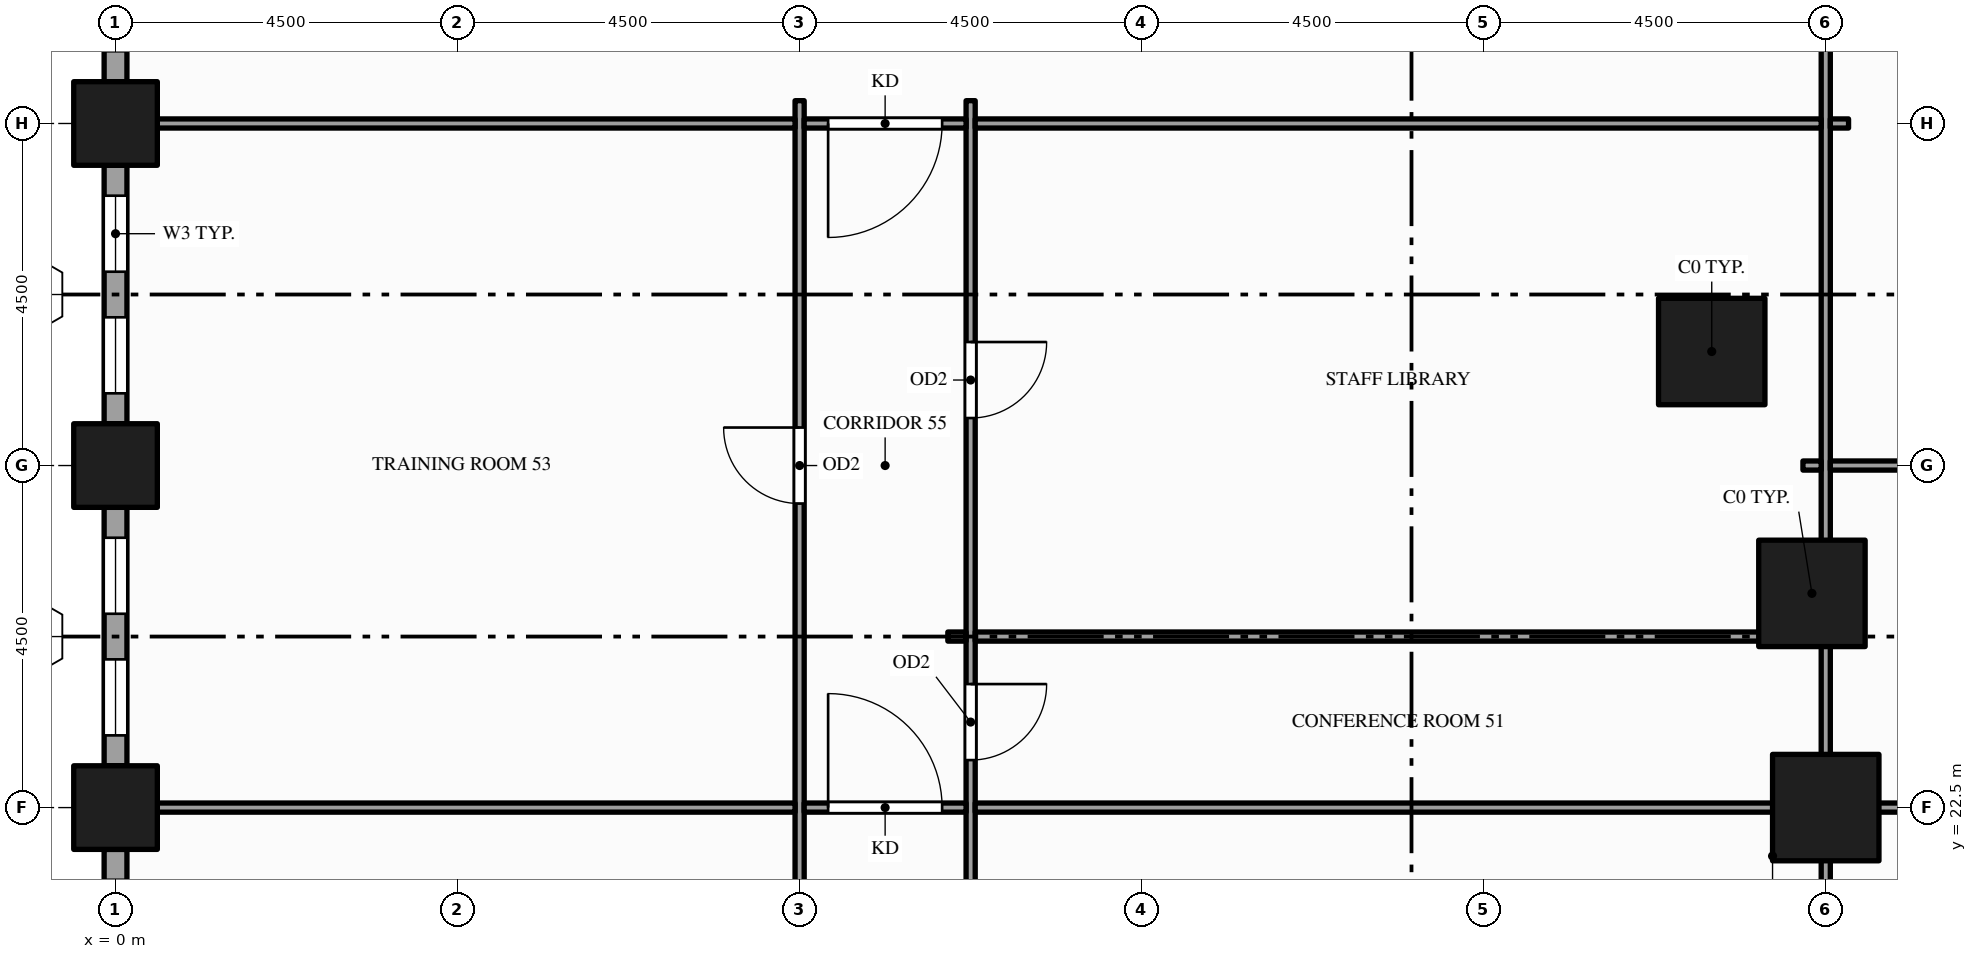
"""IFC4 building model, lengths in metres.
Left out: names, types, materials, properties, quantities, classifications, styles, units other than length and angle.
Written with IfcOpenShell. Run it as: python <this file> out.ifc"""

import sys

from ifc_helpers import new_model, si_unit, direction, frame, frame_2d, origin, origin_2d, place, context, subcontext, project, spatial, rectangle, hollow_rectangle, extrude, element, fill, save


model = new_model("IFC4")
c1 = context("Model", 3, precision=1e-05, world=origin(), true_north=direction((0.0, 1.0)))
c2 = subcontext(c1, "Body", "Model", "MODEL_VIEW")
j1 = project(units=[si_unit("LENGTHUNIT", "METRE"), si_unit("PLANEANGLEUNIT", "RADIAN")], contexts=[c1])
p1 = place(None, origin())
s1 = spatial("IfcSite", under=j1, at=p1, CompositionType="ELEMENT")
p2 = place(p1, origin())
s2 = spatial("IfcBuilding", under=s1, at=p2, CompositionType="ELEMENT")
p3 = place(p2, frame((0.0, 0.0, 19.0)))
s3 = spatial("IfcBuildingStorey", under=s2, at=p3, CompositionType="ELEMENT", Elevation=19.0)
for number, where, z_axis, x_axis in (
    (1, (0.0, 22.5, -0.25), (0.0, 0.0, 1.0), (1.0, 0.0, 0.0)),
    (2, (0.0, 27.0, -0.25), (0.0, 0.0, 1.0), (1.0, 0.0, 0.0)),
    (3, (0.0, 31.5, -0.25), (0.0, 0.0, 1.0), (1.0, 0.0, 0.0)),
):
    element("IfcColumn", number, at=place(p3, frame(where, z_axis=z_axis, x_axis=x_axis)), inside=s3, PredefinedType="COLUMN", context=c2, shape_type="SweptSolid", body=[
        extrude(hollow_rectangle(XDim=1.1, YDim=1.1, WallThickness=0.06, at=origin_2d()), origin(), (0.0, 0.0, 1.0), 5.0),
    ])
for number, where, z_axis, x_axis in (
    (4, (21.0, 28.5, -0.25), (0.0, 0.0, 1.0), (1.0, 0.0, 0.0)),
    (5, (22.318, 25.318, -0.25), (0.0, 0.0, 1.0), (1.0, 0.0, 0.0)),
    (6, (22.5, 22.5, -0.25), (0.0, 0.0, 1.0), (1.0, 0.0, 0.0)),
):
    element("IfcColumn", number, at=place(p3, frame(where, z_axis=z_axis, x_axis=x_axis)), inside=s3, PredefinedType="COLUMN", context=c2, shape_type="SweptSolid", body=[
        extrude(hollow_rectangle(XDim=1.4, YDim=1.4, WallThickness=0.08, at=origin_2d()), origin(), (0.0, 0.0, 1.0), 5.0),
    ])
p4 = place(p3, frame((0.0, 35.999, 0.0), z_axis=(0.0, 0.0, 1.0), x_axis=(0.0, -1.0, 0.0)))
e7 = element("IfcWall", 7, at=p4, inside=s3, PredefinedType="STANDARD", context=c2, shape_type="SweptSolid", body=[
    extrude(rectangle(XDim=3.949, YDim=0.3, at=frame_2d((1.975, 0.0))), origin(), (0.0, 0.0, 1.0), 4.036),
])
p5 = place(p4, frame((0.425, 0.0, 0.9)))
e8 = element("IfcOpeningElement", 8, at=p5, cuts=e7, PredefinedType="OPENING", context=c2, shape_type="SweptSolid", body=[
    extrude(rectangle(XDim=1.5, YDim=2.75, at=frame_2d((0.75, 1.375))), frame((0.0, 0.16, 0.0), z_axis=(0.0, -1.0, 0.0), x_axis=(1.0, 0.0, 0.0)), (0.0, 0.0, 1.0), 0.32),
])
p6 = place(p4, frame((2.549, 0.0, 0.9)))
e9 = element("IfcOpeningElement", 9, at=p6, cuts=e7, PredefinedType="OPENING", context=c2, shape_type="SweptSolid", body=[
    extrude(rectangle(XDim=1.0, YDim=2.75, at=frame_2d((0.5, 1.375))), frame((0.0, 0.16, 0.0), z_axis=(0.0, -1.0, 0.0), x_axis=(1.0, 0.0, 0.0)), (0.0, 0.0, 1.0), 0.32),
])
p7 = place(p3, frame((0.0, 30.95, 0.0), z_axis=(0.0, 0.0, 1.0), x_axis=(0.0, -1.0, 0.0)))
e10 = element("IfcWall", 10, at=p7, inside=s3, PredefinedType="STANDARD", context=c2, shape_type="SweptSolid", body=[
    extrude(rectangle(XDim=3.4, YDim=0.3, at=frame_2d((1.7, 0.0))), origin(), (0.0, 0.0, 1.0), 4.036),
])
p8 = place(p7, frame((0.4, 0.0, 0.9)))
e11 = element("IfcOpeningElement", 11, at=p8, cuts=e10, PredefinedType="OPENING", context=c2, shape_type="SweptSolid", body=[
    extrude(rectangle(XDim=1.0, YDim=2.75, at=frame_2d((0.5, 1.375))), frame((0.0, 0.16, 0.0), z_axis=(0.0, -1.0, 0.0), x_axis=(1.0, 0.0, 0.0)), (0.0, 0.0, 1.0), 0.32),
])
p9 = place(p7, frame((2.0, 0.0, 0.9)))
e12 = element("IfcOpeningElement", 12, at=p9, cuts=e10, PredefinedType="OPENING", context=c2, shape_type="SweptSolid", body=[
    extrude(rectangle(XDim=1.0, YDim=2.75, at=frame_2d((0.5, 1.375))), frame((0.0, 0.16, 0.0), z_axis=(0.0, -1.0, 0.0), x_axis=(1.0, 0.0, 0.0)), (0.0, 0.0, 1.0), 0.32),
])
p10 = place(p3, frame((0.0, 26.45, 0.0), z_axis=(0.0, 0.0, 1.0), x_axis=(0.0, -1.0, 0.0)))
e13 = element("IfcWall", 13, at=p10, inside=s3, PredefinedType="STANDARD", context=c2, shape_type="SweptSolid", body=[
    extrude(rectangle(XDim=3.4, YDim=0.3, at=frame_2d((1.7, 0.0))), origin(), (0.0, 0.0, 1.0), 4.036),
])
p11 = place(p10, frame((0.4, 0.0, 0.9)))
e14 = element("IfcOpeningElement", 14, at=p11, cuts=e13, PredefinedType="OPENING", context=c2, shape_type="SweptSolid", body=[
    extrude(rectangle(XDim=1.0, YDim=2.75, at=frame_2d((0.5, 1.375))), frame((0.0, 0.16, 0.0), z_axis=(0.0, -1.0, 0.0), x_axis=(1.0, 0.0, 0.0)), (0.0, 0.0, 1.0), 0.32),
])
p12 = place(p10, frame((2.0, 0.0, 0.9)))
e15 = element("IfcOpeningElement", 15, at=p12, cuts=e13, PredefinedType="OPENING", context=c2, shape_type="SweptSolid", body=[
    extrude(rectangle(XDim=1.0, YDim=2.75, at=frame_2d((0.5, 1.375))), frame((0.0, 0.16, 0.0), z_axis=(0.0, -1.0, 0.0), x_axis=(1.0, 0.0, 0.0)), (0.0, 0.0, 1.0), 0.32),
])
p13 = place(p3, frame((0.0, 21.95, 0.0), z_axis=(0.0, 0.0, 1.0), x_axis=(0.0, -1.0, 0.0)))
e16 = element("IfcWall", 16, at=p13, inside=s3, PredefinedType="STANDARD", context=c2, shape_type="SweptSolid", body=[
    extrude(rectangle(XDim=3.4, YDim=0.3, at=frame_2d((1.7, 0.0))), origin(), (0.0, 0.0, 1.0), 4.036),
])
p14 = place(p13, frame((0.4, 0.0, 0.9)))
e17 = element("IfcOpeningElement", 17, at=p14, cuts=e16, PredefinedType="OPENING", context=c2, shape_type="SweptSolid", body=[
    extrude(rectangle(XDim=1.0, YDim=2.75, at=frame_2d((0.5, 1.375))), frame((0.0, 0.16, 0.0), z_axis=(0.0, -1.0, 0.0), x_axis=(1.0, 0.0, 0.0)), (0.0, 0.0, 1.0), 0.32),
])
p15 = place(p13, frame((2.0, 0.0, 0.9)))
e18 = element("IfcOpeningElement", 18, at=p15, cuts=e16, PredefinedType="OPENING", context=c2, shape_type="SweptSolid", body=[
    extrude(rectangle(XDim=1.0, YDim=2.75, at=frame_2d((0.5, 1.375))), frame((0.0, 0.16, 0.0), z_axis=(0.0, -1.0, 0.0), x_axis=(1.0, 0.0, 0.0)), (0.0, 0.0, 1.0), 0.32),
])
p16 = place(p3, frame((9.0, 10.95, 0.0), z_axis=(0.0, 0.0, 1.0), x_axis=(0.0, 1.0, 0.0)))
e19 = element("IfcWall", 19, at=p16, inside=s3, PredefinedType="PARTITIONING", context=c2, shape_type="SweptSolid", body=[
    extrude(rectangle(XDim=20.85, YDim=0.12, at=frame_2d((10.425, 0.0))), origin(), (0.0, 0.0, 1.0), 3.5),
])
p17 = place(p16, frame((15.55, 0.0, 0.0)))
e20 = element("IfcOpeningElement", 20, at=p17, cuts=e19, PredefinedType="OPENING", context=c2, shape_type="SweptSolid", body=[
    extrude(rectangle(XDim=1.0, YDim=2.1, at=frame_2d((0.5, 1.05))), frame((0.0, 0.07, 0.0), z_axis=(0.0, -1.0, 0.0), x_axis=(1.0, 0.0, 0.0)), (0.0, 0.0, 1.0), 0.14),
])
p18 = place(p3, frame((11.25, 10.95, 0.0), z_axis=(0.0, 0.0, 1.0), x_axis=(0.0, 1.0, 0.0)))
e21 = element("IfcWall", 21, at=p18, inside=s3, PredefinedType="PARTITIONING", context=c2, shape_type="SweptSolid", body=[
    extrude(rectangle(XDim=20.85, YDim=0.12, at=frame_2d((10.425, 0.0))), origin(), (0.0, 0.0, 1.0), 3.5),
])
p19 = place(p18, frame((5.425, 0.0, 0.0)))
e22 = element("IfcOpeningElement", 22, at=p19, cuts=e21, PredefinedType="OPENING", context=c2, shape_type="SweptSolid", body=[
    extrude(rectangle(XDim=1.0, YDim=2.1, at=frame_2d((0.5, 1.05))), frame((0.0, 0.07, 0.0), z_axis=(0.0, -1.0, 0.0), x_axis=(1.0, 0.0, 0.0)), (0.0, 0.0, 1.0), 0.14),
])
p20 = place(p18, frame((12.175, 0.0, 0.0)))
e23 = element("IfcOpeningElement", 23, at=p20, cuts=e21, PredefinedType="OPENING", context=c2, shape_type="SweptSolid", body=[
    extrude(rectangle(XDim=1.0, YDim=2.1, at=frame_2d((0.5, 1.05))), frame((0.0, 0.07, 0.0), z_axis=(0.0, -1.0, 0.0), x_axis=(1.0, 0.0, 0.0)), (0.0, 0.0, 1.0), 0.14),
])
p21 = place(p18, frame((16.675, 0.0, 0.0)))
e24 = element("IfcOpeningElement", 24, at=p21, cuts=e21, PredefinedType="OPENING", context=c2, shape_type="SweptSolid", body=[
    extrude(rectangle(XDim=1.0, YDim=2.1, at=frame_2d((0.5, 1.05))), frame((0.0, 0.07, 0.0), z_axis=(0.0, -1.0, 0.0), x_axis=(1.0, 0.0, 0.0)), (0.0, 0.0, 1.0), 0.14),
])
p22 = place(p3, frame((22.5, 0.15, 0.0), z_axis=(0.0, 0.0, 1.0), x_axis=(0.0, 1.0, 0.0)))
e25 = element("IfcWall", 25, at=p22, inside=s3, PredefinedType="PARTITIONING", context=c2, shape_type="SweptSolid", body=[
    extrude(rectangle(XDim=35.95, YDim=0.12, at=frame_2d((17.975, 0.0))), origin(), (0.0, 0.0, 1.0), 3.759),
])
p23 = place(p22, frame((9.225, 0.0, 0.0)))
e26 = element("IfcOpeningElement", 26, at=p23, cuts=e25, PredefinedType="OPENING", context=c2, shape_type="SweptSolid", body=[
    extrude(rectangle(XDim=1.5, YDim=2.1, at=frame_2d((0.75, 1.05))), frame((0.0, 0.07, 0.0), z_axis=(0.0, -1.0, 0.0), x_axis=(1.0, 0.0, 0.0)), (0.0, 0.0, 1.0), 0.14),
])
p24 = place(p22, frame((32.7, 0.0, 0.0)))
e27 = element("IfcOpeningElement", 27, at=p24, cuts=e25, PredefinedType="OPENING", context=c2, shape_type="SweptSolid", body=[
    extrude(rectangle(XDim=1.8, YDim=2.1, at=frame_2d((0.9, 1.05))), frame((0.0, 0.07, 0.0), z_axis=(0.0, -1.0, 0.0), x_axis=(1.0, 0.0, 0.0)), (0.0, 0.0, 1.0), 0.14),
])
p25 = place(p3, frame((0.15, 22.5, 0.0), z_axis=(0.0, 0.0, 1.0), x_axis=(1.0, 0.0, 0.0)))
e28 = element("IfcWall", 28, at=p25, inside=s3, PredefinedType="PARTITIONING", context=c2, shape_type="SweptSolid", body=[
    extrude(rectangle(XDim=8.79, YDim=0.12, at=frame_2d((4.395, 0.0))), origin(), (0.0, 0.0, 1.0), 3.5),
])
p26 = place(p3, frame((9.06, 22.5, 0.0), z_axis=(0.0, 0.0, 1.0), x_axis=(1.0, 0.0, 0.0)))
e29 = element("IfcWall", 29, at=p26, inside=s3, PredefinedType="PARTITIONING", context=c2, shape_type="SweptSolid", body=[
    extrude(rectangle(XDim=2.13, YDim=0.12, at=frame_2d((1.065, 0.0))), origin(), (0.0, 0.0, 1.0), 3.5),
])
p27 = place(p26, frame((0.315, 0.0, 0.0)))
e30 = element("IfcOpeningElement", 30, at=p27, cuts=e29, PredefinedType="OPENING", context=c2, shape_type="SweptSolid", body=[
    extrude(rectangle(XDim=1.5, YDim=2.1, at=frame_2d((0.75, 1.05))), frame((0.0, 0.07, 0.0), z_axis=(0.0, -1.0, 0.0), x_axis=(1.0, 0.0, 0.0)), (0.0, 0.0, 1.0), 0.14),
])
p28 = place(p3, frame((11.31, 22.5, 0.0), z_axis=(0.0, 0.0, 1.0), x_axis=(1.0, 0.0, 0.0)))
e31 = element("IfcWall", 31, at=p28, inside=s3, PredefinedType="PARTITIONING", context=c2, shape_type="SweptSolid", body=[
    extrude(rectangle(XDim=11.13, YDim=0.12, at=frame_2d((5.565, 0.0))), origin(), (0.0, 0.0, 1.0), 3.5),
])
p29 = place(p3, frame((22.56, 22.5, 0.0), z_axis=(0.0, 0.0, 1.0), x_axis=(1.0, 0.0, 0.0)))
e32 = element("IfcWall", 32, at=p29, inside=s3, PredefinedType="PARTITIONING", context=c2, shape_type="SweptSolid", body=[
    extrude(rectangle(XDim=13.38, YDim=0.12, at=frame_2d((6.69, 0.0))), origin(), (0.0, 0.0, 1.0), 3.66),
])
p30 = place(p3, frame((10.95, 24.75, 0.0), z_axis=(0.0, 0.0, 1.0), x_axis=(1.0, 0.0, 0.0)))
e33 = element("IfcWall", 33, at=p30, inside=s3, PredefinedType="PARTITIONING", context=c2, shape_type="SweptSolid", body=[
    extrude(rectangle(XDim=0.24, YDim=0.12, at=frame_2d((0.12, 0.0))), origin(), (0.0, 0.0, 1.0), 3.759),
])
p31 = place(p3, frame((11.31, 24.75, 0.0), z_axis=(0.0, 0.0, 1.0), x_axis=(1.0, 0.0, 0.0)))
e34 = element("IfcWall", 34, at=p31, inside=s3, PredefinedType="PARTITIONING", context=c2, shape_type="SweptSolid", body=[
    extrude(rectangle(XDim=11.13, YDim=0.12, at=frame_2d((5.565, 0.0))), origin(), (0.0, 0.0, 1.0), 3.759),
])
p32 = place(p3, frame((22.56, 24.75, 0.0), z_axis=(0.0, 0.0, 1.0), x_axis=(1.0, 0.0, 0.0)))
e35 = element("IfcWall", 35, at=p32, inside=s3, PredefinedType="PARTITIONING", context=c2, shape_type="SweptSolid", body=[
    extrude(rectangle(XDim=0.24, YDim=0.12, at=frame_2d((0.12, 0.0))), origin(), (0.0, 0.0, 1.0), 4.75),
])
p33 = place(p3, frame((22.2, 27.0, 0.0), z_axis=(0.0, 0.0, 1.0), x_axis=(1.0, 0.0, 0.0)))
e36 = element("IfcWall", 36, at=p33, inside=s3, PredefinedType="PARTITIONING", context=c2, shape_type="SweptSolid", body=[
    extrude(rectangle(XDim=0.24, YDim=0.12, at=frame_2d((0.12, 0.0))), origin(), (0.0, 0.0, 1.0), 3.759),
])
p34 = place(p3, frame((22.56, 27.0, 0.0), z_axis=(0.0, 0.0, 1.0), x_axis=(1.0, 0.0, 0.0)))
e37 = element("IfcWall", 37, at=p34, inside=s3, PredefinedType="PARTITIONING", context=c2, shape_type="SweptSolid", body=[
    extrude(rectangle(XDim=4.38, YDim=0.12, at=frame_2d((2.19, 0.0))), origin(), (0.0, 0.0, 1.0), 3.66),
])
p35 = place(p34, frame((1.29, 0.0, 0.0)))
e38 = element("IfcOpeningElement", 38, at=p35, cuts=e37, PredefinedType="OPENING", context=c2, shape_type="SweptSolid", body=[
    extrude(rectangle(XDim=1.8, YDim=2.1, at=frame_2d((0.9, 1.05))), frame((0.0, 0.07, 0.0), z_axis=(0.0, -1.0, 0.0), x_axis=(1.0, 0.0, 0.0)), (0.0, 0.0, 1.0), 0.14),
])
p36 = place(p3, frame((0.15, 31.5, 0.0), z_axis=(0.0, 0.0, 1.0), x_axis=(1.0, 0.0, 0.0)))
e39 = element("IfcWall", 39, at=p36, inside=s3, PredefinedType="PARTITIONING", context=c2, shape_type="SweptSolid", body=[
    extrude(rectangle(XDim=8.79, YDim=0.12, at=frame_2d((4.395, 0.0))), origin(), (0.0, 0.0, 1.0), 3.759),
])
p37 = place(p3, frame((9.06, 31.5, 0.0), z_axis=(0.0, 0.0, 1.0), x_axis=(1.0, 0.0, 0.0)))
e40 = element("IfcWall", 40, at=p37, inside=s3, PredefinedType="PARTITIONING", context=c2, shape_type="SweptSolid", body=[
    extrude(rectangle(XDim=2.13, YDim=0.12, at=frame_2d((1.065, 0.0))), origin(), (0.0, 0.0, 1.0), 3.759),
])
p38 = place(p37, frame((0.315, 0.0, 0.0)))
e41 = element("IfcOpeningElement", 41, at=p38, cuts=e40, PredefinedType="OPENING", context=c2, shape_type="SweptSolid", body=[
    extrude(rectangle(XDim=1.5, YDim=2.1, at=frame_2d((0.75, 1.05))), frame((0.0, 0.07, 0.0), z_axis=(0.0, -1.0, 0.0), x_axis=(1.0, 0.0, 0.0)), (0.0, 0.0, 1.0), 0.14),
])
p39 = place(p3, frame((11.31, 31.5, 0.0), z_axis=(0.0, 0.0, 1.0), x_axis=(1.0, 0.0, 0.0)))
e42 = element("IfcWall", 42, at=p39, inside=s3, PredefinedType="PARTITIONING", context=c2, shape_type="SweptSolid", body=[
    extrude(rectangle(XDim=11.13, YDim=0.12, at=frame_2d((5.565, 0.0))), origin(), (0.0, 0.0, 1.0), 3.5),
])
p40 = place(p3, frame((22.56, 31.5, 0.0), z_axis=(0.0, 0.0, 1.0), x_axis=(1.0, 0.0, 0.0)))
e43 = element("IfcWall", 43, at=p40, inside=s3, PredefinedType="PARTITIONING", context=c2, shape_type="SweptSolid", body=[
    extrude(rectangle(XDim=0.24, YDim=0.12, at=frame_2d((0.12, 0.0))), origin(), (0.0, 0.0, 1.0), 3.759),
])
p41 = place(p8, origin())
e44 = element("IfcWindow", 44, at=p41, inside=s3, PartitioningType="SINGLE_PANEL", PredefinedType="WINDOW", context=c2, shape_type="SweptSolid", body=[
    extrude(rectangle(XDim=1.0, YDim=2.75, at=frame_2d((0.5, 1.375))), frame((0.0, 0.03, 0.0), z_axis=(0.0, -1.0, 0.0), x_axis=(1.0, 0.0, 0.0)), (0.0, 0.0, 1.0), 0.06),
])
fill(e11, e44)
p42 = place(p9, origin())
e45 = element("IfcWindow", 45, at=p42, inside=s3, PartitioningType="SINGLE_PANEL", PredefinedType="WINDOW", context=c2, shape_type="SweptSolid", body=[
    extrude(rectangle(XDim=1.0, YDim=2.75, at=frame_2d((0.5, 1.375))), frame((0.0, 0.03, 0.0), z_axis=(0.0, -1.0, 0.0), x_axis=(1.0, 0.0, 0.0)), (0.0, 0.0, 1.0), 0.06),
])
fill(e12, e45)
p43 = place(p11, origin())
e46 = element("IfcWindow", 46, at=p43, inside=s3, PartitioningType="SINGLE_PANEL", PredefinedType="WINDOW", context=c2, shape_type="SweptSolid", body=[
    extrude(rectangle(XDim=1.0, YDim=2.75, at=frame_2d((0.5, 1.375))), frame((0.0, 0.03, 0.0), z_axis=(0.0, -1.0, 0.0), x_axis=(1.0, 0.0, 0.0)), (0.0, 0.0, 1.0), 0.06),
])
fill(e14, e46)
p44 = place(p12, origin())
e47 = element("IfcWindow", 47, at=p44, inside=s3, PartitioningType="SINGLE_PANEL", PredefinedType="WINDOW", context=c2, shape_type="SweptSolid", body=[
    extrude(rectangle(XDim=1.0, YDim=2.75, at=frame_2d((0.5, 1.375))), frame((0.0, 0.03, 0.0), z_axis=(0.0, -1.0, 0.0), x_axis=(1.0, 0.0, 0.0)), (0.0, 0.0, 1.0), 0.06),
])
fill(e15, e47)
p45 = place(p27, origin())
e48 = element("IfcDoor", 48, at=p45, inside=s3, OperationType="SINGLE_SWING_LEFT", PredefinedType="DOOR", context=c2, shape_type="SweptSolid", body=[
    extrude(rectangle(XDim=1.5, YDim=2.1, at=frame_2d((0.75, 1.05))), frame((0.0, 0.025, 0.0), z_axis=(0.0, -1.0, 0.0), x_axis=(1.0, 0.0, 0.0)), (0.0, 0.0, 1.0), 0.05),
])
fill(e30, e48)
p46 = place(p38, origin())
e49 = element("IfcDoor", 49, at=p46, inside=s3, OperationType="SINGLE_SWING_LEFT", PredefinedType="DOOR", context=c2, shape_type="SweptSolid", body=[
    extrude(rectangle(XDim=1.5, YDim=2.1, at=frame_2d((0.75, 1.05))), frame((0.0, 0.025, 0.0), z_axis=(0.0, -1.0, 0.0), x_axis=(1.0, 0.0, 0.0)), (0.0, 0.0, 1.0), 0.05),
])
fill(e41, e49)
p47 = place(p17, origin())
e50 = element("IfcDoor", 50, at=p47, inside=s3, OperationType="SINGLE_SWING_RIGHT", PredefinedType="DOOR", context=c2, shape_type="SweptSolid", body=[
    extrude(rectangle(XDim=1.0, YDim=2.1, at=frame_2d((0.5, 1.05))), frame((0.0, 0.025, 0.0), z_axis=(0.0, -1.0, 0.0), x_axis=(1.0, 0.0, 0.0)), (0.0, 0.0, 1.0), 0.05),
])
fill(e20, e50)
p48 = place(p20, origin())
e51 = element("IfcDoor", 51, at=p48, inside=s3, OperationType="SINGLE_SWING_RIGHT", PredefinedType="DOOR", context=c2, shape_type="SweptSolid", body=[
    extrude(rectangle(XDim=1.0, YDim=2.1, at=frame_2d((0.5, 1.05))), frame((0.0, 0.025, 0.0), z_axis=(0.0, -1.0, 0.0), x_axis=(1.0, 0.0, 0.0)), (0.0, 0.0, 1.0), 0.05),
])
fill(e23, e51)
p49 = place(p21, origin())
e52 = element("IfcDoor", 52, at=p49, inside=s3, OperationType="SINGLE_SWING_RIGHT", PredefinedType="DOOR", context=c2, shape_type="SweptSolid", body=[
    extrude(rectangle(XDim=1.0, YDim=2.1, at=frame_2d((0.5, 1.05))), frame((0.0, 0.025, 0.0), z_axis=(0.0, -1.0, 0.0), x_axis=(1.0, 0.0, 0.0)), (0.0, 0.0, 1.0), 0.05),
])
fill(e24, e52)
save(model, sys.argv[1])
